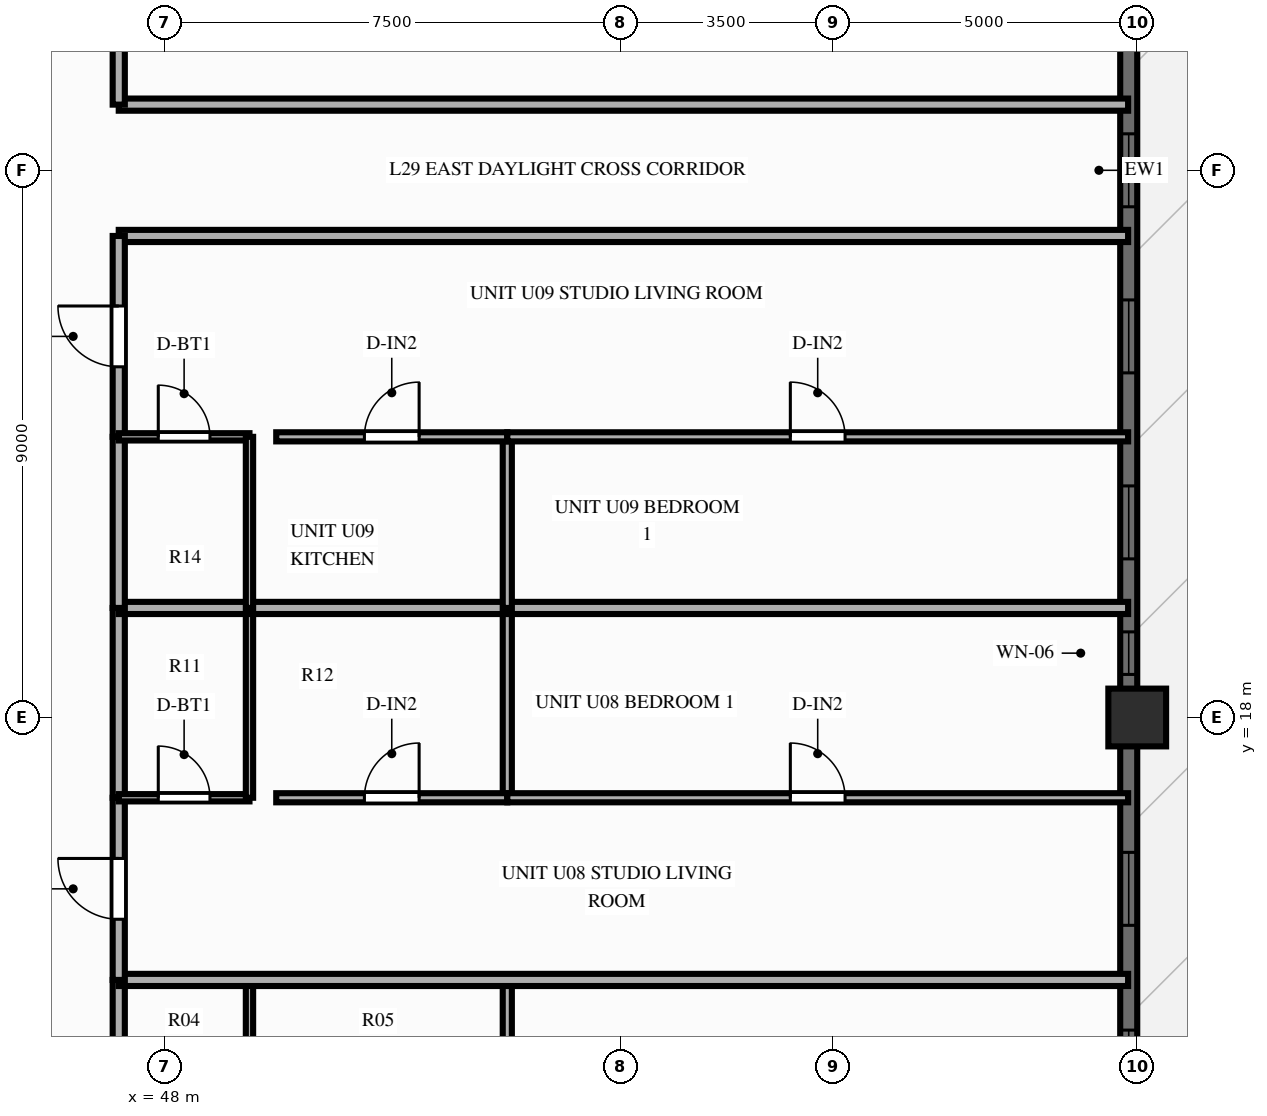
"""IFC4 building model, lengths in metres.
Left out: names, types, materials, properties, quantities, classifications, styles, units other than length and angle.
Written with IfcOpenShell. Run it as: python <this file> out.ifc"""

import sys

from ifc_helpers import new_model, si_unit, direction, frame, frame_2d, origin, origin_2d, place, context, subcontext, project, spatial, rectangle, extrude, source, transform, mapped, element, fill, save


model = new_model("IFC4")
c1 = context("Model", 3, precision=1e-05, world=origin(), true_north=direction((0.0, 1.0)))
c2 = subcontext(c1, "Body", "Model", "MODEL_VIEW")
j1 = project(units=[si_unit("LENGTHUNIT", "METRE"), si_unit("PLANEANGLEUNIT", "RADIAN")], contexts=[c1])
p1 = place(None, origin())
s1 = spatial("IfcSite", under=j1, at=p1, CompositionType="ELEMENT")
p2 = place(p1, origin())
s2 = spatial("IfcBuilding", under=s1, at=p2, CompositionType="ELEMENT")
p3 = place(p2, frame((0.0, 0.0, 92.85)))
s3 = spatial("IfcBuildingStorey", under=s2, at=p3, CompositionType="ELEMENT", Elevation=92.85)
m1 = source(origin(), c2, "Body", "SweptSolid", [
    extrude(rectangle(XDim=0.95, YDim=0.95, at=origin_2d()), origin(), (0.0, 0.0, 1.0), 3.0),
])
p4 = place(p3, frame((64.0, 18.0, 0.0), z_axis=(0.0, 0.0, 1.0), x_axis=(1.0, 0.0, 0.0)))
e1 = element("IfcColumn", 1, at=p4, inside=s3, PredefinedType="COLUMN", context=c2, shape_type="MappedRepresentation", body=[
    mapped(m1, transform((0.0, 0.0, 0.0), scale=1.0)),
])
p5 = place(p3, frame((63.86, 7.2, 0.0), z_axis=(0.0, 0.0, 1.0), x_axis=(0.0, 1.0, 0.0)))
e2 = element("IfcWall", 2, at=p5, inside=s3, PredefinedType="SOLIDWALL", context=c2, shape_type="SweptSolid", body=[
    extrude(rectangle(XDim=39.6, YDim=0.28, at=frame_2d((19.8, 0.0))), origin(), (0.0, 0.0, 1.0), 2.28),
])
p6 = place(p5, frame((1.374, 0.0, 0.25)))
e3 = element("IfcOpeningElement", 3, at=p6, cuts=e2, PredefinedType="OPENING", context=c2, shape_type="SweptSolid", body=[
    extrude(rectangle(XDim=1.2, YDim=1.5, at=frame_2d((0.6, 0.75))), frame((0.0, 0.152, 0.0), z_axis=(0.0, -1.0, 0.0), x_axis=(1.0, 0.0, 0.0)), (0.0, 0.0, 1.0), 0.304),
])
p7 = place(p5, frame((4.458, 0.0, 0.25)))
e4 = element("IfcOpeningElement", 4, at=p7, cuts=e2, PredefinedType="OPENING", context=c2, shape_type="SweptSolid", body=[
    extrude(rectangle(XDim=1.2, YDim=1.5, at=frame_2d((0.6, 0.75))), frame((0.0, 0.152, 0.0), z_axis=(0.0, -1.0, 0.0), x_axis=(1.0, 0.0, 0.0)), (0.0, 0.0, 1.0), 0.304),
])
p8 = place(p5, frame((7.382, 0.0, 0.25)))
e5 = element("IfcOpeningElement", 5, at=p8, cuts=e2, PredefinedType="OPENING", context=c2, shape_type="SweptSolid", body=[
    extrude(rectangle(XDim=1.2, YDim=1.5, at=frame_2d((0.6, 0.75))), frame((0.0, 0.152, 0.0), z_axis=(0.0, -1.0, 0.0), x_axis=(1.0, 0.0, 0.0)), (0.0, 0.0, 1.0), 0.304),
])
p9 = place(p5, frame((11.508, 0.0, 0.25)))
e6 = element("IfcOpeningElement", 6, at=p9, cuts=e2, PredefinedType="OPENING", context=c2, shape_type="SweptSolid", body=[
    extrude(rectangle(XDim=0.7, YDim=1.5, at=frame_2d((0.35, 0.75))), frame((0.0, 0.152, 0.0), z_axis=(0.0, -1.0, 0.0), x_axis=(1.0, 0.0, 0.0)), (0.0, 0.0, 1.0), 0.304),
])
p10 = place(p5, frame((13.409, 0.0, 0.25)))
e7 = element("IfcOpeningElement", 7, at=p10, cuts=e2, PredefinedType="OPENING", context=c2, shape_type="SweptSolid", body=[
    extrude(rectangle(XDim=1.2, YDim=1.5, at=frame_2d((0.6, 0.75))), frame((0.0, 0.152, 0.0), z_axis=(0.0, -1.0, 0.0), x_axis=(1.0, 0.0, 0.0)), (0.0, 0.0, 1.0), 0.304),
])
p11 = place(p5, frame((16.468, 0.0, 0.25)))
e8 = element("IfcOpeningElement", 8, at=p11, cuts=e2, PredefinedType="OPENING", context=c2, shape_type="SweptSolid", body=[
    extrude(rectangle(XDim=1.2, YDim=1.5, at=frame_2d((0.6, 0.75))), frame((0.0, 0.152, 0.0), z_axis=(0.0, -1.0, 0.0), x_axis=(1.0, 0.0, 0.0)), (0.0, 0.0, 1.0), 0.304),
])
p12 = place(p5, frame((19.2, 0.0, 0.25)))
e9 = element("IfcOpeningElement", 9, at=p12, cuts=e2, PredefinedType="OPENING", context=c2, shape_type="SweptSolid", body=[
    extrude(rectangle(XDim=1.2, YDim=1.5, at=frame_2d((0.6, 0.75))), frame((0.0, 0.152, 0.0), z_axis=(0.0, -1.0, 0.0), x_axis=(1.0, 0.0, 0.0)), (0.0, 0.0, 1.0), 0.304),
])
p13 = place(p5, frame((23.407, 0.0, 0.0), z_axis=(0.0, 0.0, 1.0), x_axis=(-1.0, 0.0, 0.0)))
e10 = element("IfcOpeningElement", 10, at=p13, cuts=e2, PredefinedType="OPENING", context=c2, shape_type="SweptSolid", body=[
    extrude(rectangle(XDim=1.6, YDim=2.15, at=frame_2d((0.8, 1.075))), frame((0.0, 0.152, 0.0), z_axis=(0.0, -1.0, 0.0), x_axis=(1.0, 0.0, 0.0)), (0.0, 0.0, 1.0), 0.304),
])
p14 = place(p5, frame((25.159, 0.0, 0.25)))
e11 = element("IfcOpeningElement", 11, at=p14, cuts=e2, PredefinedType="OPENING", context=c2, shape_type="SweptSolid", body=[
    extrude(rectangle(XDim=1.2, YDim=1.5, at=frame_2d((0.6, 0.75))), frame((0.0, 0.152, 0.0), z_axis=(0.0, -1.0, 0.0), x_axis=(1.0, 0.0, 0.0)), (0.0, 0.0, 1.0), 0.304),
])
p15 = place(p5, frame((27.484, 0.0, 0.25)))
e12 = element("IfcOpeningElement", 12, at=p15, cuts=e2, PredefinedType="OPENING", context=c2, shape_type="SweptSolid", body=[
    extrude(rectangle(XDim=0.7, YDim=1.5, at=frame_2d((0.35, 0.75))), frame((0.0, 0.152, 0.0), z_axis=(0.0, -1.0, 0.0), x_axis=(1.0, 0.0, 0.0)), (0.0, 0.0, 1.0), 0.304),
])
p16 = place(p5, frame((31.111, 0.0, 0.25)))
e13 = element("IfcOpeningElement", 13, at=p16, cuts=e2, PredefinedType="OPENING", context=c2, shape_type="SweptSolid", body=[
    extrude(rectangle(XDim=1.2, YDim=1.5, at=frame_2d((0.6, 0.75))), frame((0.0, 0.152, 0.0), z_axis=(0.0, -1.0, 0.0), x_axis=(1.0, 0.0, 0.0)), (0.0, 0.0, 1.0), 0.304),
])
p17 = place(p5, frame((34.109, 0.0, 0.25)))
e14 = element("IfcOpeningElement", 14, at=p17, cuts=e2, PredefinedType="OPENING", context=c2, shape_type="SweptSolid", body=[
    extrude(rectangle(XDim=1.2, YDim=1.5, at=frame_2d((0.6, 0.75))), frame((0.0, 0.152, 0.0), z_axis=(0.0, -1.0, 0.0), x_axis=(1.0, 0.0, 0.0)), (0.0, 0.0, 1.0), 0.304),
])
p18 = place(p5, frame((37.101, 0.0, 0.25)))
e15 = element("IfcOpeningElement", 15, at=p18, cuts=e2, PredefinedType="OPENING", context=c2, shape_type="SweptSolid", body=[
    extrude(rectangle(XDim=1.2, YDim=1.5, at=frame_2d((0.6, 0.75))), frame((0.0, 0.152, 0.0), z_axis=(0.0, -1.0, 0.0), x_axis=(1.0, 0.0, 0.0)), (0.0, 0.0, 1.0), 0.304),
])
p19 = place(p3, frame((47.25, 25.92, 0.0), z_axis=(0.0, 0.0, 1.0), x_axis=(1.0, 0.0, 0.0)))
e16 = element("IfcWall", 16, at=p19, inside=s3, PredefinedType="PARTITIONING", context=c2, shape_type="SweptSolid", body=[
    extrude(rectangle(XDim=16.6, YDim=0.2, at=frame_2d((8.3, 0.0))), origin(), (0.0, 0.0, 1.0), 2.79),
])
p20 = place(p3, frame((47.25, 10.833, 0.0), z_axis=(0.0, 0.0, 1.0), x_axis=(0.0, 1.0, 0.0)))
e17 = element("IfcWall", 17, at=p20, inside=s3, PredefinedType="PARTITIONING", context=c2, shape_type="SweptSolid", body=[
    extrude(rectangle(XDim=2.85, YDim=0.2, at=frame_2d((1.425, 0.0))), origin(), (0.0, 0.0, 1.0), 2.79),
])
p21 = place(p3, frame((49.4, 10.833, 0.0), z_axis=(0.0, 0.0, 1.0), x_axis=(0.0, 1.0, 0.0)))
e18 = element("IfcWall", 18, at=p21, inside=s3, PredefinedType="PARTITIONING", context=c2, shape_type="SweptSolid", body=[
    extrude(rectangle(XDim=2.85, YDim=0.12, at=frame_2d((1.425, 0.0))), origin(), (0.0, 0.0, 1.0), 2.79),
])
p22 = place(p3, frame((53.64, 10.833, 0.0), z_axis=(0.0, 0.0, 1.0), x_axis=(0.0, 1.0, 0.0)))
e19 = element("IfcWall", 19, at=p22, inside=s3, PredefinedType="PARTITIONING", context=c2, shape_type="SweptSolid", body=[
    extrude(rectangle(XDim=2.85, YDim=0.15, at=frame_2d((1.425, 0.0))), origin(), (0.0, 0.0, 1.0), 2.79),
])
p23 = place(p3, frame((47.25, 13.684, 0.0), z_axis=(0.0, 0.0, 1.0), x_axis=(1.0, 0.0, 0.0)))
e20 = element("IfcWall", 20, at=p23, inside=s3, PredefinedType="PARTITIONING", context=c2, shape_type="SweptSolid", body=[
    extrude(rectangle(XDim=16.6, YDim=0.2, at=frame_2d((8.3, 0.0))), origin(), (0.0, 0.0, 1.0), 2.79),
])
p24 = place(p3, frame((47.25, 13.684, 0.0), z_axis=(0.0, 0.0, 1.0), x_axis=(0.0, 1.0, 0.0)))
e21 = element("IfcWall", 21, at=p24, inside=s3, PredefinedType="PARTITIONING", context=c2, shape_type="SweptSolid", body=[
    extrude(rectangle(XDim=2.996, YDim=0.2, at=frame_2d((1.498, 0.0))), origin(), (0.0, 0.0, 1.0), 2.79),
])
p25 = place(p24, frame((0.998, 0.0, 0.0)))
e22 = element("IfcOpeningElement", 22, at=p25, cuts=e21, PredefinedType="OPENING", context=c2, shape_type="SweptSolid", body=[
    extrude(rectangle(XDim=1.0, YDim=2.15, at=frame_2d((0.5, 1.075))), frame((0.0, 0.112, 0.0), z_axis=(0.0, -1.0, 0.0), x_axis=(1.0, 0.0, 0.0)), (0.0, 0.0, 1.0), 0.224),
])
p26 = place(p3, frame((47.25, 16.68, 0.0), z_axis=(0.0, 0.0, 1.0), x_axis=(0.0, 1.0, 0.0)))
e23 = element("IfcWall", 23, at=p26, inside=s3, PredefinedType="PARTITIONING", context=c2, shape_type="SweptSolid", body=[
    extrude(rectangle(XDim=3.122, YDim=0.2, at=frame_2d((1.561, 0.0))), origin(), (0.0, 0.0, 1.0), 2.79),
])
p27 = place(p3, frame((47.25, 16.68, 0.0), z_axis=(0.0, 0.0, 1.0), x_axis=(1.0, 0.0, 0.0)))
e24 = element("IfcWall", 24, at=p27, inside=s3, PredefinedType="PARTITIONING", context=c2, shape_type="SweptSolid", body=[
    extrude(rectangle(XDim=2.15, YDim=0.12, at=frame_2d((1.075, 0.0))), origin(), (0.0, 0.0, 1.0), 2.79),
])
p28 = place(p27, frame((0.65, 0.0, 0.0)))
e25 = element("IfcOpeningElement", 25, at=p28, cuts=e24, PredefinedType="OPENING", context=c2, shape_type="SweptSolid", body=[
    extrude(rectangle(XDim=0.85, YDim=2.05, at=frame_2d((0.425, 1.025))), frame((0.0, 0.072, 0.0), z_axis=(0.0, -1.0, 0.0), x_axis=(1.0, 0.0, 0.0)), (0.0, 0.0, 1.0), 0.144),
])
p29 = place(p3, frame((49.4, 16.68, 0.0), z_axis=(0.0, 0.0, 1.0), x_axis=(0.0, 1.0, 0.0)))
e26 = element("IfcWall", 26, at=p29, inside=s3, PredefinedType="PARTITIONING", context=c2, shape_type="SweptSolid", body=[
    extrude(rectangle(XDim=3.122, YDim=0.12, at=frame_2d((1.561, 0.0))), origin(), (0.0, 0.0, 1.0), 2.79),
])
p30 = place(p3, frame((53.64, 16.68, 0.0), z_axis=(0.0, 0.0, 1.0), x_axis=(0.0, 1.0, 0.0)))
e27 = element("IfcWall", 27, at=p30, inside=s3, PredefinedType="PARTITIONING", context=c2, shape_type="SweptSolid", body=[
    extrude(rectangle(XDim=3.122, YDim=0.15, at=frame_2d((1.561, 0.0))), origin(), (0.0, 0.0, 1.0), 2.79),
])
p31 = place(p3, frame((49.84, 16.68, 0.0), z_axis=(0.0, 0.0, 1.0), x_axis=(1.0, 0.0, 0.0)))
e28 = element("IfcWall", 28, at=p31, inside=s3, PredefinedType="PARTITIONING", context=c2, shape_type="SweptSolid", body=[
    extrude(rectangle(XDim=3.8, YDim=0.15, at=frame_2d((1.9, 0.0))), origin(), (0.0, 0.0, 1.0), 2.79),
])
p32 = place(p31, frame((1.45, 0.0, 0.0)))
e29 = element("IfcOpeningElement", 29, at=p32, cuts=e28, PredefinedType="OPENING", context=c2, shape_type="SweptSolid", body=[
    extrude(rectangle(XDim=0.9, YDim=2.1, at=frame_2d((0.45, 1.05))), frame((0.0, 0.087, 0.0), z_axis=(0.0, -1.0, 0.0), x_axis=(1.0, 0.0, 0.0)), (0.0, 0.0, 1.0), 0.174),
])
p33 = place(p3, frame((53.64, 16.68, 0.0), z_axis=(0.0, 0.0, 1.0), x_axis=(1.0, 0.0, 0.0)))
e30 = element("IfcWall", 30, at=p33, inside=s3, PredefinedType="PARTITIONING", context=c2, shape_type="SweptSolid", body=[
    extrude(rectangle(XDim=10.21, YDim=0.15, at=frame_2d((5.105, 0.0))), origin(), (0.0, 0.0, 1.0), 2.79),
])
p34 = place(p33, frame((4.655, 0.0, 0.0)))
e31 = element("IfcOpeningElement", 31, at=p34, cuts=e30, PredefinedType="OPENING", context=c2, shape_type="SweptSolid", body=[
    extrude(rectangle(XDim=0.9, YDim=2.1, at=frame_2d((0.45, 1.05))), frame((0.0, 0.087, 0.0), z_axis=(0.0, -1.0, 0.0), x_axis=(1.0, 0.0, 0.0)), (0.0, 0.0, 1.0), 0.174),
])
p35 = place(p3, frame((47.25, 19.802, 0.0), z_axis=(0.0, 0.0, 1.0), x_axis=(1.0, 0.0, 0.0)))
e32 = element("IfcWall", 32, at=p35, inside=s3, PredefinedType="PARTITIONING", context=c2, shape_type="SweptSolid", body=[
    extrude(rectangle(XDim=16.6, YDim=0.2, at=frame_2d((8.3, 0.0))), origin(), (0.0, 0.0, 1.0), 2.79),
])
p36 = place(p3, frame((47.25, 19.802, 0.0), z_axis=(0.0, 0.0, 1.0), x_axis=(0.0, 1.0, 0.0)))
e33 = element("IfcWall", 33, at=p36, inside=s3, PredefinedType="PARTITIONING", context=c2, shape_type="SweptSolid", body=[
    extrude(rectangle(XDim=2.814, YDim=0.2, at=frame_2d((1.407, 0.0))), origin(), (0.0, 0.0, 1.0), 2.79),
])
p37 = place(p3, frame((47.25, 22.616, 0.0), z_axis=(0.0, 0.0, 1.0), x_axis=(0.0, 1.0, 0.0)))
e34 = element("IfcWall", 34, at=p37, inside=s3, PredefinedType="PARTITIONING", context=c2, shape_type="SweptSolid", body=[
    extrude(rectangle(XDim=3.304, YDim=0.2, at=frame_2d((1.652, 0.0))), origin(), (0.0, 0.0, 1.0), 2.79),
])
p38 = place(p37, frame((1.152, 0.0, 0.0)))
e35 = element("IfcOpeningElement", 35, at=p38, cuts=e34, PredefinedType="OPENING", context=c2, shape_type="SweptSolid", body=[
    extrude(rectangle(XDim=1.0, YDim=2.15, at=frame_2d((0.5, 1.075))), frame((0.0, 0.112, 0.0), z_axis=(0.0, -1.0, 0.0), x_axis=(1.0, 0.0, 0.0)), (0.0, 0.0, 1.0), 0.224),
])
p39 = place(p3, frame((47.25, 22.616, 0.0), z_axis=(0.0, 0.0, 1.0), x_axis=(1.0, 0.0, 0.0)))
e36 = element("IfcWall", 36, at=p39, inside=s3, PredefinedType="PARTITIONING", context=c2, shape_type="SweptSolid", body=[
    extrude(rectangle(XDim=2.15, YDim=0.12, at=frame_2d((1.075, 0.0))), origin(), (0.0, 0.0, 1.0), 2.79),
])
p40 = place(p39, frame((0.65, 0.0, 0.0)))
e37 = element("IfcOpeningElement", 37, at=p40, cuts=e36, PredefinedType="OPENING", context=c2, shape_type="SweptSolid", body=[
    extrude(rectangle(XDim=0.85, YDim=2.05, at=frame_2d((0.425, 1.025))), frame((0.0, 0.072, 0.0), z_axis=(0.0, -1.0, 0.0), x_axis=(1.0, 0.0, 0.0)), (0.0, 0.0, 1.0), 0.144),
])
p41 = place(p3, frame((49.4, 19.802, 0.0), z_axis=(0.0, 0.0, 1.0), x_axis=(0.0, 1.0, 0.0)))
e38 = element("IfcWall", 38, at=p41, inside=s3, PredefinedType="PARTITIONING", context=c2, shape_type="SweptSolid", body=[
    extrude(rectangle(XDim=2.814, YDim=0.12, at=frame_2d((1.407, 0.0))), origin(), (0.0, 0.0, 1.0), 2.79),
])
p42 = place(p3, frame((53.64, 19.802, 0.0), z_axis=(0.0, 0.0, 1.0), x_axis=(0.0, 1.0, 0.0)))
e39 = element("IfcWall", 39, at=p42, inside=s3, PredefinedType="PARTITIONING", context=c2, shape_type="SweptSolid", body=[
    extrude(rectangle(XDim=2.814, YDim=0.15, at=frame_2d((1.407, 0.0))), origin(), (0.0, 0.0, 1.0), 2.79),
])
p43 = place(p3, frame((49.84, 22.616, 0.0), z_axis=(0.0, 0.0, 1.0), x_axis=(1.0, 0.0, 0.0)))
e40 = element("IfcWall", 40, at=p43, inside=s3, PredefinedType="PARTITIONING", context=c2, shape_type="SweptSolid", body=[
    extrude(rectangle(XDim=3.8, YDim=0.15, at=frame_2d((1.9, 0.0))), origin(), (0.0, 0.0, 1.0), 2.79),
])
p44 = place(p43, frame((1.45, 0.0, 0.0)))
e41 = element("IfcOpeningElement", 41, at=p44, cuts=e40, PredefinedType="OPENING", context=c2, shape_type="SweptSolid", body=[
    extrude(rectangle(XDim=0.9, YDim=2.1, at=frame_2d((0.45, 1.05))), frame((0.0, 0.087, 0.0), z_axis=(0.0, -1.0, 0.0), x_axis=(1.0, 0.0, 0.0)), (0.0, 0.0, 1.0), 0.174),
])
p45 = place(p3, frame((53.64, 22.616, 0.0), z_axis=(0.0, 0.0, 1.0), x_axis=(1.0, 0.0, 0.0)))
e42 = element("IfcWall", 42, at=p45, inside=s3, PredefinedType="PARTITIONING", context=c2, shape_type="SweptSolid", body=[
    extrude(rectangle(XDim=10.21, YDim=0.15, at=frame_2d((5.105, 0.0))), origin(), (0.0, 0.0, 1.0), 2.79),
])
p46 = place(p45, frame((4.655, 0.0, 0.0)))
e43 = element("IfcOpeningElement", 43, at=p46, cuts=e42, PredefinedType="OPENING", context=c2, shape_type="SweptSolid", body=[
    extrude(rectangle(XDim=0.9, YDim=2.1, at=frame_2d((0.45, 1.05))), frame((0.0, 0.087, 0.0), z_axis=(0.0, -1.0, 0.0), x_axis=(1.0, 0.0, 0.0)), (0.0, 0.0, 1.0), 0.174),
])
p47 = place(p3, frame((47.25, 28.08, 0.0), z_axis=(0.0, 0.0, 1.0), x_axis=(1.0, 0.0, 0.0)))
e44 = element("IfcWall", 44, at=p47, inside=s3, PredefinedType="PARTITIONING", context=c2, shape_type="SweptSolid", body=[
    extrude(rectangle(XDim=16.6, YDim=0.2, at=frame_2d((8.3, 0.0))), origin(), (0.0, 0.0, 1.0), 2.79),
])
p48 = place(p3, frame((47.25, 28.08, 0.0), z_axis=(0.0, 0.0, 1.0), x_axis=(0.0, 1.0, 0.0)))
e45 = element("IfcWall", 45, at=p48, inside=s3, PredefinedType="PARTITIONING", context=c2, shape_type="SweptSolid", body=[
    extrude(rectangle(XDim=3.454, YDim=0.2, at=frame_2d((1.727, 0.0))), origin(), (0.0, 0.0, 1.0), 2.79),
])
p49 = place(p48, frame((1.227, 0.0, 0.0)))
e46 = element("IfcOpeningElement", 46, at=p49, cuts=e45, PredefinedType="OPENING", context=c2, shape_type="SweptSolid", body=[
    extrude(rectangle(XDim=1.0, YDim=2.15, at=frame_2d((0.5, 1.075))), frame((0.0, 0.112, 0.0), z_axis=(0.0, -1.0, 0.0), x_axis=(1.0, 0.0, 0.0)), (0.0, 0.0, 1.0), 0.224),
])
m2 = source(origin(), c2, "Body", "SweptSolid", [
    extrude(rectangle(XDim=1.2, YDim=1.5, at=frame_2d((0.6, 0.75))), frame((0.0, 0.03, 0.0), z_axis=(0.0, -1.0, 0.0), x_axis=(1.0, 0.0, 0.0)), (0.0, 0.0, 1.0), 0.06),
])
p50 = place(p7, origin())
e47 = element("IfcWindow", 47, at=p50, inside=s3, PartitioningType="SINGLE_PANEL", PredefinedType="WINDOW", context=c2, shape_type="MappedRepresentation", body=[
    mapped(m2, transform((0.0, 0.0, 0.0), scale=1.0)),
])
fill(e4, e47)
p51 = place(p8, origin())
e48 = element("IfcWindow", 48, at=p51, inside=s3, PartitioningType="SINGLE_PANEL", PredefinedType="WINDOW", context=c2, shape_type="MappedRepresentation", body=[
    mapped(m2, transform((0.0, 0.0, 0.0), scale=1.0)),
])
fill(e5, e48)
m3 = source(origin(), c2, "Body", "SweptSolid", [
    extrude(rectangle(XDim=0.7, YDim=1.5, at=frame_2d((0.35, 0.75))), frame((0.0, 0.03, 0.0), z_axis=(0.0, -1.0, 0.0), x_axis=(1.0, 0.0, 0.0)), (0.0, 0.0, 1.0), 0.06),
])
p52 = place(p9, origin())
e49 = element("IfcWindow", 49, at=p52, inside=s3, PartitioningType="SINGLE_PANEL", PredefinedType="WINDOW", context=c2, shape_type="MappedRepresentation", body=[
    mapped(m3, transform((0.0, 0.0, 0.0), scale=1.0)),
])
fill(e6, e49)
p53 = place(p10, origin())
e50 = element("IfcWindow", 50, at=p53, inside=s3, PartitioningType="SINGLE_PANEL", PredefinedType="WINDOW", context=c2, shape_type="MappedRepresentation", body=[
    mapped(m2, transform((0.0, 0.0, 0.0), scale=1.0)),
])
fill(e7, e50)
p54 = place(p11, origin())
e51 = element("IfcWindow", 51, at=p54, inside=s3, PartitioningType="SINGLE_PANEL", PredefinedType="WINDOW", context=c2, shape_type="MappedRepresentation", body=[
    mapped(m2, transform((0.0, 0.0, 0.0), scale=1.0)),
])
fill(e8, e51)
p55 = place(p12, origin())
e52 = element("IfcWindow", 52, at=p55, inside=s3, PartitioningType="SINGLE_PANEL", PredefinedType="WINDOW", context=c2, shape_type="MappedRepresentation", body=[
    mapped(m2, transform((0.0, 0.0, 0.0), scale=1.0)),
])
fill(e9, e52)
m4 = source(origin(), c2, "Body", "SweptSolid", [
    extrude(rectangle(XDim=1.0, YDim=2.15, at=frame_2d((0.5, 1.075))), frame((0.0, 0.025, 0.0), z_axis=(0.0, -1.0, 0.0), x_axis=(1.0, 0.0, 0.0)), (0.0, 0.0, 1.0), 0.05),
])
p56 = place(p25, origin())
e53 = element("IfcDoor", 53, at=p56, inside=s3, OperationType="SINGLE_SWING_RIGHT", PredefinedType="DOOR", context=c2, shape_type="MappedRepresentation", body=[
    mapped(m4, transform((0.0, 0.0, 0.0), scale=1.0)),
])
fill(e22, e53)
m5 = source(origin(), c2, "Body", "SweptSolid", [
    extrude(rectangle(XDim=0.85, YDim=2.05, at=frame_2d((0.425, 1.025))), frame((0.0, 0.025, 0.0), z_axis=(0.0, -1.0, 0.0), x_axis=(1.0, 0.0, 0.0)), (0.0, 0.0, 1.0), 0.05),
])
p57 = place(p28, origin())
e54 = element("IfcDoor", 54, at=p57, inside=s3, OperationType="SINGLE_SWING_LEFT", PredefinedType="DOOR", context=c2, shape_type="MappedRepresentation", body=[
    mapped(m5, transform((0.0, 0.0, 0.0), scale=1.0)),
])
fill(e25, e54)
m6 = source(origin(), c2, "Body", "SweptSolid", [
    extrude(rectangle(XDim=0.9, YDim=2.1, at=frame_2d((0.45, 1.05))), frame((0.0, 0.025, 0.0), z_axis=(0.0, -1.0, 0.0), x_axis=(1.0, 0.0, 0.0)), (0.0, 0.0, 1.0), 0.05),
])
p58 = place(p32, origin())
e55 = element("IfcDoor", 55, at=p58, inside=s3, OperationType="SINGLE_SWING_RIGHT", PredefinedType="DOOR", context=c2, shape_type="MappedRepresentation", body=[
    mapped(m6, transform((0.0, 0.0, 0.0), scale=1.0)),
])
fill(e29, e55)
p59 = place(p34, origin())
e56 = element("IfcDoor", 56, at=p59, inside=s3, OperationType="SINGLE_SWING_LEFT", PredefinedType="DOOR", context=c2, shape_type="MappedRepresentation", body=[
    mapped(m6, transform((0.0, 0.0, 0.0), scale=1.0)),
])
fill(e31, e56)
p60 = place(p38, origin())
e57 = element("IfcDoor", 57, at=p60, inside=s3, OperationType="SINGLE_SWING_RIGHT", PredefinedType="DOOR", context=c2, shape_type="MappedRepresentation", body=[
    mapped(m4, transform((0.0, 0.0, 0.0), scale=1.0)),
])
fill(e35, e57)
p61 = place(p40, origin())
e58 = element("IfcDoor", 58, at=p61, inside=s3, OperationType="SINGLE_SWING_LEFT", PredefinedType="DOOR", context=c2, shape_type="MappedRepresentation", body=[
    mapped(m5, transform((0.0, 0.0, 0.0), scale=1.0)),
])
fill(e37, e58)
p62 = place(p44, origin())
e59 = element("IfcDoor", 59, at=p62, inside=s3, OperationType="SINGLE_SWING_RIGHT", PredefinedType="DOOR", context=c2, shape_type="MappedRepresentation", body=[
    mapped(m6, transform((0.0, 0.0, 0.0), scale=1.0)),
])
fill(e41, e59)
p63 = place(p46, origin())
e60 = element("IfcDoor", 60, at=p63, inside=s3, OperationType="SINGLE_SWING_LEFT", PredefinedType="DOOR", context=c2, shape_type="MappedRepresentation", body=[
    mapped(m6, transform((0.0, 0.0, 0.0), scale=1.0)),
])
fill(e43, e60)
save(model, sys.argv[1])
